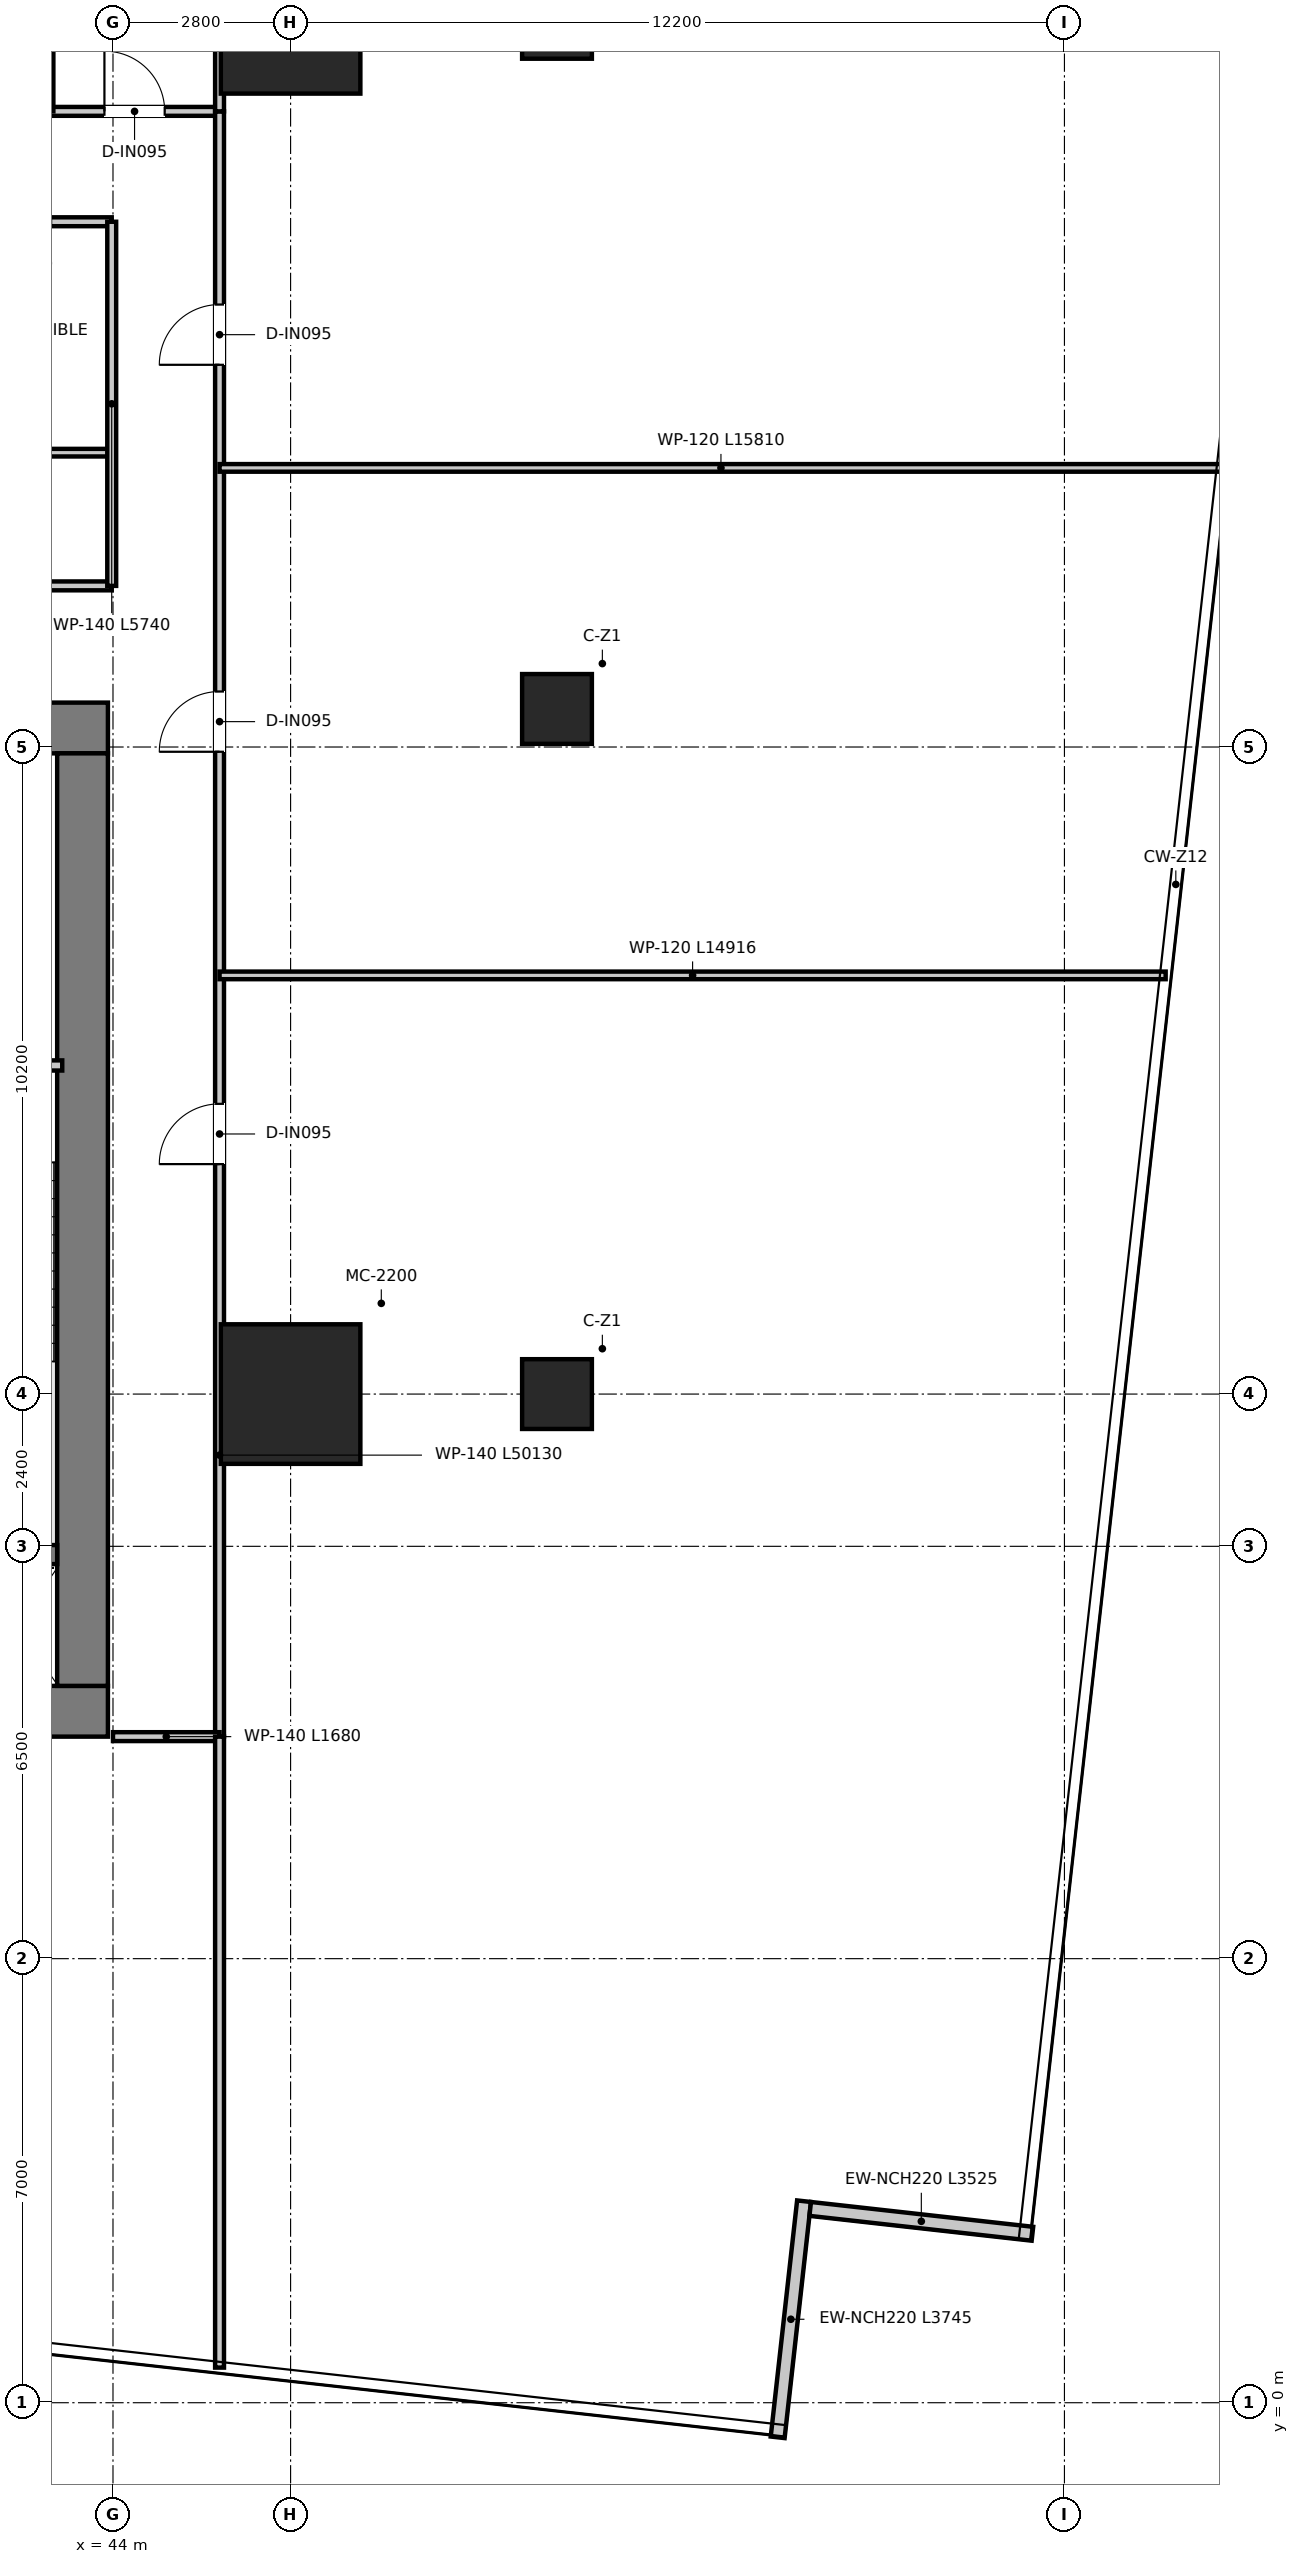
"""IFC4 building model, lengths in metres.
Left out: names, types, materials, properties, quantities, classifications, styles, units other than length and angle.
Written with IfcOpenShell. Run it as: python <this file> out.ifc"""

import sys

from ifc_helpers import new_model, si_unit, direction, frame, frame_2d, origin, origin_2d, place, context, subcontext, project, spatial, rectangle, extrude, source, transform, mapped, element, fill, save


model = new_model("IFC4")
c1 = context("Model", 3, precision=1e-05, world=origin(), true_north=direction((0.0, 1.0)))
c2 = subcontext(c1, "Body", "Model", "MODEL_VIEW")
j1 = project(units=[si_unit("LENGTHUNIT", "METRE"), si_unit("PLANEANGLEUNIT", "RADIAN")], contexts=[c1])
p1 = place(None, origin())
s1 = spatial("IfcSite", under=j1, at=p1, CompositionType="ELEMENT")
p2 = place(p1, origin())
s2 = spatial("IfcBuilding", under=s1, at=p2, CompositionType="ELEMENT")
p3 = place(p2, frame((0.0, 0.0, 64.5)))
s3 = spatial("IfcBuildingStorey", under=s2, at=p3, CompositionType="ELEMENT", Elevation=64.5)
p4 = place(p3, frame((28.08, 10.9, 0.0), z_axis=(0.0, 0.0, 1.0), x_axis=(1.0, 0.0, 0.0)))
e1 = element("IfcWall", 1, at=p4, inside=s3, PredefinedType="SHEAR", context=c2, shape_type="SweptSolid", body=[
    extrude(rectangle(XDim=15.84, YDim=0.8, at=frame_2d((7.92, 0.0))), origin(), (0.0, 0.0, 1.0), 3.95),
])
p5 = place(p3, frame((28.08, 26.4, 0.0), z_axis=(0.0, 0.0, 1.0), x_axis=(1.0, 0.0, 0.0)))
e2 = element("IfcWall", 2, at=p5, inside=s3, PredefinedType="SHEAR", context=c2, shape_type="SweptSolid", body=[
    extrude(rectangle(XDim=15.84, YDim=0.8, at=frame_2d((7.92, 0.0))), origin(), (0.0, 0.0, 1.0), 3.95),
])
p6 = place(p5, frame((7.22, 0.0, 0.0)))
e3 = element("IfcOpeningElement", 3, at=p6, cuts=e2, PredefinedType="OPENING", context=c2, shape_type="SweptSolid", body=[
    extrude(rectangle(XDim=1.4, YDim=2.2, at=frame_2d((0.7, 1.1))), frame((0.0, 0.41, 0.0), z_axis=(0.0, -1.0, 0.0), x_axis=(1.0, 0.0, 0.0)), (0.0, 0.0, 1.0), 0.82),
])
p7 = place(p5, frame((1.775, 0.0, 0.0)))
e4 = element("IfcOpeningElement", 4, at=p7, cuts=e2, PredefinedType="OPENING", context=c2, shape_type="SweptSolid", body=[
    extrude(rectangle(XDim=1.05, YDim=2.1, at=frame_2d((0.525, 1.05))), frame((0.0, 0.41, 0.0), z_axis=(0.0, -1.0, 0.0), x_axis=(1.0, 0.0, 0.0)), (0.0, 0.0, 1.0), 0.82),
])
p8 = place(p5, frame((13.015, 0.0, 0.0)))
e5 = element("IfcOpeningElement", 5, at=p8, cuts=e2, PredefinedType="OPENING", context=c2, shape_type="SweptSolid", body=[
    extrude(rectangle(XDim=1.05, YDim=2.1, at=frame_2d((0.525, 1.05))), frame((0.0, 0.41, 0.0), z_axis=(0.0, -1.0, 0.0), x_axis=(1.0, 0.0, 0.0)), (0.0, 0.0, 1.0), 0.82),
])
p9 = place(p3, frame((43.52, 11.3, 0.0), z_axis=(0.0, 0.0, 1.0), x_axis=(0.0, 1.0, 0.0)))
e6 = element("IfcWall", 6, at=p9, inside=s3, PredefinedType="SHEAR", context=c2, shape_type="SweptSolid", body=[
    extrude(rectangle(XDim=14.7, YDim=0.8, at=frame_2d((7.35, 0.0))), origin(), (0.0, 0.0, 1.0), 3.95),
])
p10 = place(p3, frame((40.02, 13.37, 0.0), z_axis=(0.0, 0.0, 1.0), x_axis=(1.0, 0.0, 0.0)))
e7 = element("IfcWall", 7, at=p10, inside=s3, PredefinedType="SHEAR", context=c2, shape_type="SweptSolid", body=[
    extrude(rectangle(XDim=3.1, YDim=0.3, at=frame_2d((1.55, 0.0))), origin(), (0.0, 0.0, 1.0), 3.95),
])
m1 = source(origin(), c2, "Body", "SweptSolid", [
    extrude(rectangle(XDim=2.2, YDim=2.2, at=origin_2d()), origin(), (0.0, 0.0, 1.0), 3.95),
])
for number, where, z_axis, x_axis in (
    (8, (46.8, 15.9, 0.0), (0.0, 0.0, 1.0), (1.0, 0.0, 0.0)),
    (9, (46.8, 37.5, 0.0), (0.0, 0.0, 1.0), (1.0, 0.0, 0.0)),
):
    element("IfcColumn", number, at=place(p3, frame(where, z_axis=z_axis, x_axis=x_axis)), inside=s3, PredefinedType="USERDEFINED", context=c2, shape_type="MappedRepresentation", body=[
        mapped(m1, transform((0.0, 0.0, 0.0), x_axis=(1.0, 0.0, 0.0), y_axis=(0.0, 1.0, 0.0), z_axis=(0.0, 0.0, 1.0), scale=1.0)),
    ])
m2 = source(origin(), c2, "Body", "SweptSolid", [
    extrude(rectangle(XDim=1.1, YDim=1.1, at=origin_2d()), origin(), (0.0, 0.0, 1.0), 3.95),
])
for number, where, z_axis, x_axis in (
    (10, (51.0, 37.5, 0.0), (0.0, 0.0, 1.0), (1.0, 0.0, 0.0)),
    (11, (51.0, 26.7, 0.0), (0.0, 0.0, 1.0), (1.0, 0.0, 0.0)),
    (12, (51.0, 15.9, 0.0), (0.0, 0.0, 1.0), (1.0, 0.0, 0.0)),
):
    element("IfcColumn", number, at=place(p3, frame(where, z_axis=z_axis, x_axis=x_axis)), inside=s3, PredefinedType="COLUMN", context=c2, shape_type="MappedRepresentation", body=[
        mapped(m2, transform((0.0, 0.0, 0.0), x_axis=(1.0, 0.0, 0.0), y_axis=(0.0, 1.0, 0.0), z_axis=(0.0, 0.0, 1.0), scale=1.0)),
    ])
p11 = place(p3, frame((54.479, -0.545, 0.0), z_axis=(0.0, 0.0, 1.0), x_axis=(0.111082600583, 0.99381117716, 0.0)))
e13 = element("IfcWall", 13, at=p11, inside=s3, PredefinedType="ELEMENTEDWALL", context=c2, shape_type="SweptSolid", body=[
    extrude(rectangle(XDim=3.745, YDim=0.22, at=frame_2d((1.873, 0.0))), origin(), (0.0, 0.0, 1.0), 3.67),
])
p12 = place(p3, frame((54.992, 3.055, 0.0), z_axis=(0.0, 0.0, 1.0), x_axis=(0.993817675948, -0.111024443135, 0.0)))
e14 = element("IfcWall", 14, at=p12, inside=s3, PredefinedType="ELEMENTEDWALL", context=c2, shape_type="SweptSolid", body=[
    extrude(rectangle(XDim=3.525, YDim=0.22, at=frame_2d((1.762, 0.0))), origin(), (0.0, 0.0, 1.0), 3.67),
])
p13 = place(p3, frame((40.04, 21.08, 0.0), z_axis=(0.0, 0.0, 1.0), x_axis=(1.0, 0.0, 0.0)))
e15 = element("IfcWall", 15, at=p13, inside=s3, PredefinedType="PARTITIONING", context=c2, shape_type="SweptSolid", body=[
    extrude(rectangle(XDim=3.16, YDim=0.16, at=frame_2d((1.58, 0.0))), origin(), (0.0, 0.0, 1.0), 3.67),
])
p14 = place(p13, frame((1.055, 0.0, 0.0)))
e16 = element("IfcOpeningElement", 16, at=p14, cuts=e15, PredefinedType="OPENING", context=c2, shape_type="SweptSolid", body=[
    extrude(rectangle(XDim=1.05, YDim=2.1, at=frame_2d((0.525, 1.05))), frame((0.0, 0.09, 0.0), z_axis=(0.0, -1.0, 0.0), x_axis=(1.0, 0.0, 0.0)), (0.0, 0.0, 1.0), 0.18),
])
p15 = place(p3, frame((28.02, 28.64, 0.0), z_axis=(0.0, 0.0, 1.0), x_axis=(1.0, 0.0, 0.0)))
e17 = element("IfcWall", 17, at=p15, inside=s3, PredefinedType="PARTITIONING", context=c2, shape_type="SweptSolid", body=[
    extrude(rectangle(XDim=15.96, YDim=0.14, at=frame_2d((7.98, 0.0))), origin(), (0.0, 0.0, 1.0), 3.08),
])
p16 = place(p15, frame((7.455, 0.0, 0.0)))
e18 = element("IfcOpeningElement", 18, at=p16, cuts=e17, PredefinedType="OPENING", context=c2, shape_type="SweptSolid", body=[
    extrude(rectangle(XDim=1.05, YDim=2.15, at=frame_2d((0.525, 1.075))), frame((0.0, 0.08, 0.0), z_axis=(0.0, -1.0, 0.0), x_axis=(1.0, 0.0, 0.0)), (0.0, 0.0, 1.0), 0.16),
])
p17 = place(p3, frame((28.02, 30.74, 0.0), z_axis=(0.0, 0.0, 1.0), x_axis=(1.0, 0.0, 0.0)))
e19 = element("IfcWall", 19, at=p17, inside=s3, PredefinedType="PARTITIONING", context=c2, shape_type="SweptSolid", body=[
    extrude(rectangle(XDim=15.96, YDim=0.12, at=frame_2d((7.98, 0.0))), origin(), (0.0, 0.0, 1.0), 3.08),
])
p18 = place(p3, frame((28.02, 34.38, 0.0), z_axis=(0.0, 0.0, 1.0), x_axis=(1.0, 0.0, 0.0)))
e20 = element("IfcWall", 20, at=p18, inside=s3, PredefinedType="PARTITIONING", context=c2, shape_type="SweptSolid", body=[
    extrude(rectangle(XDim=15.96, YDim=0.14, at=frame_2d((7.98, 0.0))), origin(), (0.0, 0.0, 1.0), 3.08),
])
p19 = place(p18, frame((7.83, 0.0, 0.0)))
e21 = element("IfcOpeningElement", 21, at=p19, cuts=e20, PredefinedType="OPENING", context=c2, shape_type="SweptSolid", body=[
    extrude(rectangle(XDim=0.9, YDim=2.1, at=frame_2d((0.45, 1.05))), frame((0.0, 0.08, 0.0), z_axis=(0.0, -1.0, 0.0), x_axis=(1.0, 0.0, 0.0)), (0.0, 0.0, 1.0), 0.16),
])
p20 = place(p18, frame((11.03, 0.0, 0.0)))
e22 = element("IfcOpeningElement", 22, at=p20, cuts=e20, PredefinedType="OPENING", context=c2, shape_type="SweptSolid", body=[
    extrude(rectangle(XDim=0.9, YDim=2.1, at=frame_2d((0.45, 1.05))), frame((0.0, 0.08, 0.0), z_axis=(0.0, -1.0, 0.0), x_axis=(1.0, 0.0, 0.0)), (0.0, 0.0, 1.0), 0.16),
])
p21 = place(p18, frame((14.055, 0.0, 0.0)))
e23 = element("IfcOpeningElement", 23, at=p21, cuts=e20, PredefinedType="OPENING", context=c2, shape_type="SweptSolid", body=[
    extrude(rectangle(XDim=0.95, YDim=2.1, at=frame_2d((0.475, 1.05))), frame((0.0, 0.08, 0.0), z_axis=(0.0, -1.0, 0.0), x_axis=(1.0, 0.0, 0.0)), (0.0, 0.0, 1.0), 0.16),
])
p22 = place(p18, frame((2.855, 0.0, 0.0)))
e24 = element("IfcOpeningElement", 24, at=p22, cuts=e20, PredefinedType="OPENING", context=c2, shape_type="SweptSolid", body=[
    extrude(rectangle(XDim=0.95, YDim=2.1, at=frame_2d((0.475, 1.05))), frame((0.0, 0.08, 0.0), z_axis=(0.0, -1.0, 0.0), x_axis=(1.0, 0.0, 0.0)), (0.0, 0.0, 1.0), 0.16),
])
p23 = place(p3, frame((43.98, 28.64, 0.0), z_axis=(0.0, 0.0, 1.0), x_axis=(0.0, 1.0, 0.0)))
e25 = element("IfcWall", 25, at=p23, inside=s3, PredefinedType="PARTITIONING", context=c2, shape_type="SweptSolid", body=[
    extrude(rectangle(XDim=5.74, YDim=0.14, at=frame_2d((2.87, 0.0))), origin(), (0.0, 0.0, 1.0), 3.22),
])
p24 = place(p3, frame((26.32, 36.12, 0.0), z_axis=(0.0, 0.0, 1.0), x_axis=(1.0, 0.0, 0.0)))
e26 = element("IfcWall", 26, at=p24, inside=s3, PredefinedType="PARTITIONING", context=c2, shape_type="SweptSolid", body=[
    extrude(rectangle(XDim=19.36, YDim=0.14, at=frame_2d((9.68, 0.0))), origin(), (0.0, 0.0, 1.0), 3.08),
])
p25 = place(p24, frame((1.115, 0.0, 0.0)))
e27 = element("IfcOpeningElement", 27, at=p25, cuts=e26, PredefinedType="OPENING", context=c2, shape_type="SweptSolid", body=[
    extrude(rectangle(XDim=0.95, YDim=2.1, at=frame_2d((0.475, 1.05))), frame((0.0, 0.08, 0.0), z_axis=(0.0, -1.0, 0.0), x_axis=(1.0, 0.0, 0.0)), (0.0, 0.0, 1.0), 0.16),
])
p26 = place(p24, frame((4.955, 0.0, 0.0)))
e28 = element("IfcOpeningElement", 28, at=p26, cuts=e26, PredefinedType="OPENING", context=c2, shape_type="SweptSolid", body=[
    extrude(rectangle(XDim=0.95, YDim=2.1, at=frame_2d((0.475, 1.05))), frame((0.0, 0.08, 0.0), z_axis=(0.0, -1.0, 0.0), x_axis=(1.0, 0.0, 0.0)), (0.0, 0.0, 1.0), 0.16),
])
p27 = place(p24, frame((9.455, 0.0, 0.0)))
e29 = element("IfcOpeningElement", 29, at=p27, cuts=e26, PredefinedType="OPENING", context=c2, shape_type="SweptSolid", body=[
    extrude(rectangle(XDim=0.95, YDim=2.1, at=frame_2d((0.475, 1.05))), frame((0.0, 0.08, 0.0), z_axis=(0.0, -1.0, 0.0), x_axis=(1.0, 0.0, 0.0)), (0.0, 0.0, 1.0), 0.16),
])
p28 = place(p24, frame((13.955, 0.0, 0.0)))
e30 = element("IfcOpeningElement", 30, at=p28, cuts=e26, PredefinedType="OPENING", context=c2, shape_type="SweptSolid", body=[
    extrude(rectangle(XDim=0.95, YDim=2.1, at=frame_2d((0.475, 1.05))), frame((0.0, 0.08, 0.0), z_axis=(0.0, -1.0, 0.0), x_axis=(1.0, 0.0, 0.0)), (0.0, 0.0, 1.0), 0.16),
])
p29 = place(p24, frame((17.545, 0.0, 0.0)))
e31 = element("IfcOpeningElement", 31, at=p29, cuts=e26, PredefinedType="OPENING", context=c2, shape_type="SweptSolid", body=[
    extrude(rectangle(XDim=0.95, YDim=2.1, at=frame_2d((0.475, 1.05))), frame((0.0, 0.08, 0.0), z_axis=(0.0, -1.0, 0.0), x_axis=(1.0, 0.0, 0.0)), (0.0, 0.0, 1.0), 0.16),
])
p30 = place(p3, frame((45.68, 10.5, 0.0), z_axis=(0.0, 0.0, 1.0), x_axis=(0.0, 1.0, 0.0)))
e32 = element("IfcWall", 32, at=p30, inside=s3, PredefinedType="PARTITIONING", context=c2, shape_type="SweptSolid", body=[
    extrude(rectangle(XDim=25.62, YDim=0.14, at=frame_2d((12.81, 0.0))), origin(), (0.0, 0.0, 1.0), 2.97),
])
p31 = place(p30, frame((9.025, 0.0, 0.0)))
e33 = element("IfcOpeningElement", 33, at=p31, cuts=e32, PredefinedType="OPENING", context=c2, shape_type="SweptSolid", body=[
    extrude(rectangle(XDim=0.95, YDim=2.1, at=frame_2d((0.475, 1.05))), frame((0.0, 0.08, 0.0), z_axis=(0.0, -1.0, 0.0), x_axis=(1.0, 0.0, 0.0)), (0.0, 0.0, 1.0), 0.16),
])
p32 = place(p30, frame((15.525, 0.0, 0.0)))
e34 = element("IfcOpeningElement", 34, at=p32, cuts=e32, PredefinedType="OPENING", context=c2, shape_type="SweptSolid", body=[
    extrude(rectangle(XDim=0.95, YDim=2.1, at=frame_2d((0.475, 1.05))), frame((0.0, 0.08, 0.0), z_axis=(0.0, -1.0, 0.0), x_axis=(1.0, 0.0, 0.0)), (0.0, 0.0, 1.0), 0.16),
])
p33 = place(p30, frame((21.625, 0.0, 0.0)))
e35 = element("IfcOpeningElement", 35, at=p33, cuts=e32, PredefinedType="OPENING", context=c2, shape_type="SweptSolid", body=[
    extrude(rectangle(XDim=0.95, YDim=2.1, at=frame_2d((0.475, 1.05))), frame((0.0, 0.08, 0.0), z_axis=(0.0, -1.0, 0.0), x_axis=(1.0, 0.0, 0.0)), (0.0, 0.0, 1.0), 0.16),
])
p34 = place(p3, frame((44.0, 10.5, 0.0), z_axis=(0.0, 0.0, 1.0), x_axis=(1.0, 0.0, 0.0)))
e36 = element("IfcWall", 36, at=p34, inside=s3, PredefinedType="PARTITIONING", context=c2, shape_type="SweptSolid", body=[
    extrude(rectangle(XDim=1.68, YDim=0.14, at=frame_2d((0.84, 0.0))), origin(), (0.0, 0.0, 1.0), 3.67),
])
p35 = place(p3, frame((45.68, 36.12, 0.0), z_axis=(0.0, 0.0, 1.0), x_axis=(0.0, 1.0, 0.0)))
e37 = element("IfcWall", 37, at=p35, inside=s3, PredefinedType="PARTITIONING", context=c2, shape_type="SweptSolid", body=[
    extrude(rectangle(XDim=14.563, YDim=0.14, at=frame_2d((7.282, 0.0))), origin(), (0.0, 0.0, 1.0), 2.97),
])
p36 = place(p3, frame((45.68, 0.553, 0.0), z_axis=(0.0, 0.0, 1.0), x_axis=(0.0, 1.0, 0.0)))
e38 = element("IfcWall", 38, at=p36, inside=s3, PredefinedType="PARTITIONING", context=c2, shape_type="SweptSolid", body=[
    extrude(rectangle(XDim=9.947, YDim=0.14, at=frame_2d((4.973, 0.0))), origin(), (0.0, 0.0, 1.0), 3.67),
])
p37 = place(p3, frame((43.0, 36.12, 0.0), z_axis=(0.0, 0.0, 1.0), x_axis=(0.0, 1.0, 0.0)))
e39 = element("IfcWall", 39, at=p37, inside=s3, PredefinedType="PARTITIONING", context=c2, shape_type="SweptSolid", body=[
    extrude(rectangle(XDim=14.863, YDim=0.12, at=frame_2d((7.431, 0.0))), origin(), (0.0, 0.0, 1.0), 2.97),
])
p38 = place(p3, frame((45.68, 22.5, 0.0), z_axis=(0.0, 0.0, 1.0), x_axis=(1.0, 0.0, 0.0)))
e40 = element("IfcWall", 40, at=p38, inside=s3, PredefinedType="PARTITIONING", context=c2, shape_type="SweptSolid", body=[
    extrude(rectangle(XDim=14.916, YDim=0.12, at=frame_2d((7.458, 0.0))), origin(), (0.0, 0.0, 1.0), 2.97),
])
p39 = place(p3, frame((45.68, 30.5, 0.0), z_axis=(0.0, 0.0, 1.0), x_axis=(1.0, 0.0, 0.0)))
e41 = element("IfcWall", 41, at=p39, inside=s3, PredefinedType="PARTITIONING", context=c2, shape_type="SweptSolid", body=[
    extrude(rectangle(XDim=15.81, YDim=0.12, at=frame_2d((7.905, 0.0))), origin(), (0.0, 0.0, 1.0), 2.97),
])
p40 = place(p29, origin())
e42 = element("IfcDoor", 42, at=p40, inside=s3, OperationType="SINGLE_SWING_LEFT", PredefinedType="DOOR", context=c2, shape_type="SweptSolid", body=[
    extrude(rectangle(XDim=0.95, YDim=2.1, at=frame_2d((0.475, 1.05))), frame((0.0, 0.025, 0.0), z_axis=(0.0, -1.0, 0.0), x_axis=(1.0, 0.0, 0.0)), (0.0, 0.0, 1.0), 0.05),
])
fill(e31, e42)
p41 = place(p31, origin())
e43 = element("IfcDoor", 43, at=p41, inside=s3, OperationType="SINGLE_SWING_LEFT", PredefinedType="DOOR", context=c2, shape_type="SweptSolid", body=[
    extrude(rectangle(XDim=0.95, YDim=2.1, at=frame_2d((0.475, 1.05))), frame((0.0, 0.025, 0.0), z_axis=(0.0, -1.0, 0.0), x_axis=(1.0, 0.0, 0.0)), (0.0, 0.0, 1.0), 0.05),
])
fill(e33, e43)
p42 = place(p32, origin())
e44 = element("IfcDoor", 44, at=p42, inside=s3, OperationType="SINGLE_SWING_LEFT", PredefinedType="DOOR", context=c2, shape_type="SweptSolid", body=[
    extrude(rectangle(XDim=0.95, YDim=2.1, at=frame_2d((0.475, 1.05))), frame((0.0, 0.025, 0.0), z_axis=(0.0, -1.0, 0.0), x_axis=(1.0, 0.0, 0.0)), (0.0, 0.0, 1.0), 0.05),
])
fill(e34, e44)
p43 = place(p33, origin())
e45 = element("IfcDoor", 45, at=p43, inside=s3, OperationType="SINGLE_SWING_LEFT", PredefinedType="DOOR", context=c2, shape_type="SweptSolid", body=[
    extrude(rectangle(XDim=0.95, YDim=2.1, at=frame_2d((0.475, 1.05))), frame((0.0, 0.025, 0.0), z_axis=(0.0, -1.0, 0.0), x_axis=(1.0, 0.0, 0.0)), (0.0, 0.0, 1.0), 0.05),
])
fill(e35, e45)
save(model, sys.argv[1])
